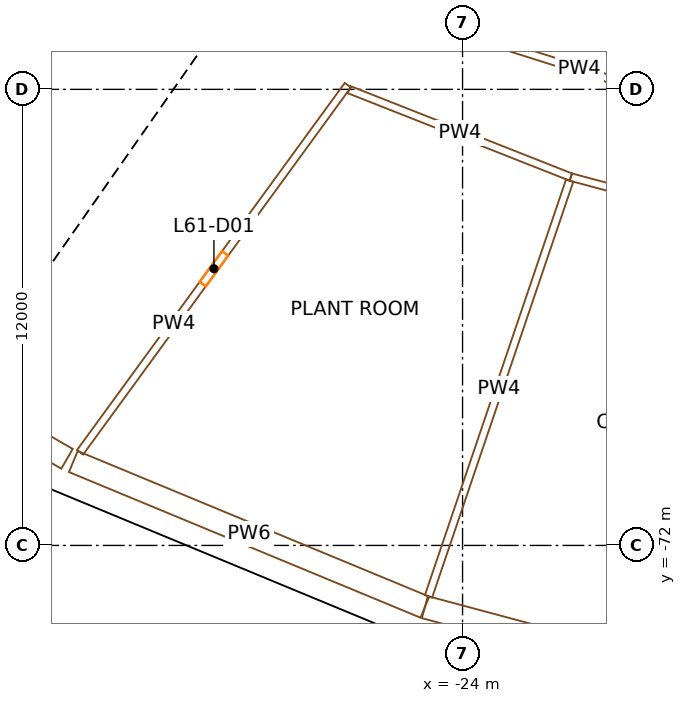
"""IFC4 building model, lengths in metres.
Left out: names, types, materials, properties, quantities, classifications, styles, units other than length and angle.
Written with IfcOpenShell. Run it as: python <this file> out.ifc"""

import sys

from ifc_helpers import new_model, si_unit, direction, frame, frame_2d, origin, origin_2d, place, context, subcontext, project, spatial, rectangle, extrude, element, fill, save


model = new_model("IFC4")
c1 = context("Model", 3, precision=1e-05, world=origin(), true_north=direction((0.0, 1.0)))
c2 = subcontext(c1, "Body", "Model", "MODEL_VIEW")
j1 = project(units=[si_unit("LENGTHUNIT", "METRE"), si_unit("PLANEANGLEUNIT", "RADIAN")], contexts=[c1])
p1 = place(None, origin())
s1 = spatial("IfcSite", under=j1, at=p1, CompositionType="ELEMENT")
p2 = place(p1, origin())
s2 = spatial("IfcBuilding", under=s1, at=p2, CompositionType="ELEMENT")
p3 = place(p2, frame((0.0, 0.0, 253.1)))
s3 = spatial("IfcBuildingStorey", under=s2, at=p3, CompositionType="ELEMENT", Elevation=253.1)
for number, where, z_axis, x_axis in (
    (1, (-34.388, -69.732, 0.0), (0.0, 0.0, 1.0), (0.897, -0.442, 0.0)),
    (2, (-24.992, -73.624, 0.0), (0.0, 0.0, 1.0), (0.947, -0.321, 0.0)),
):
    element("IfcColumn", number, at=place(p3, frame(where, z_axis=z_axis, x_axis=x_axis)), inside=s3, PredefinedType="COLUMN", context=c2, shape_type="SweptSolid", body=[
        extrude(rectangle(XDim=1.0, YDim=1.15, at=origin_2d()), origin(), (0.0, 0.0, 1.0), 5.0),
    ])
p4 = place(p3, frame((-36.667, -66.005, 0.0), z_axis=(0.0, 0.0, 1.0), x_axis=(0.573568499524, 0.819157601658, 0.0)))
e3 = element("IfcWall", 3, at=p4, inside=s3, PredefinedType="SHEAR", context=c2, shape_type="SweptSolid", body=[
    extrude(rectangle(XDim=14.2, YDim=0.6, at=frame_2d((7.1, 0.0))), origin(), (0.0, 0.0, 1.0), 4.7),
])
p5 = place(p4, frame((5.9, 0.0, 0.0)))
e4 = element("IfcOpeningElement", 4, at=p5, cuts=e3, PredefinedType="OPENING", context=c2, shape_type="SweptSolid", body=[
    extrude(rectangle(XDim=2.4, YDim=2.1, at=frame_2d((1.2, 1.05))), frame((0.0, 0.31, 0.0), z_axis=(0.0, -1.0, 0.0), x_axis=(1.0, 0.0, 0.0)), (0.0, 0.0, 1.0), 0.62),
])
p6 = place(p3, frame((-33.787, -61.369, 0.0), z_axis=(0.0, 0.0, 1.0), x_axis=(-0.819152564888, 0.573575692858, 0.0)))
e5 = element("IfcWall", 5, at=p6, inside=s3, PredefinedType="SOLIDWALL", context=c2, shape_type="SweptSolid", body=[
    extrude(rectangle(XDim=7.95, YDim=0.3, at=frame_2d((3.975, 0.0))), origin(), (0.0, 0.0, 1.0), 4.7),
])
p7 = place(p6, frame((0.675, 0.0, 0.0)))
e6 = element("IfcOpeningElement", 6, at=p7, cuts=e5, PredefinedType="OPENING", context=c2, shape_type="SweptSolid", body=[
    extrude(rectangle(XDim=1.1, YDim=2.1, at=frame_2d((0.55, 1.05))), frame((0.0, 0.16, 0.0), z_axis=(0.0, -1.0, 0.0), x_axis=(1.0, 0.0, 0.0)), (0.0, 0.0, 1.0), 0.32),
])
p8 = place(p6, frame((3.425, 0.0, 0.0)))
e7 = element("IfcOpeningElement", 7, at=p8, cuts=e5, PredefinedType="OPENING", context=c2, shape_type="SweptSolid", body=[
    extrude(rectangle(XDim=1.1, YDim=2.1, at=frame_2d((0.55, 1.05))), frame((0.0, 0.16, 0.0), z_axis=(0.0, -1.0, 0.0), x_axis=(1.0, 0.0, 0.0)), (0.0, 0.0, 1.0), 0.32),
])
p9 = place(p6, frame((6.175, 0.0, 0.0)))
e8 = element("IfcOpeningElement", 8, at=p9, cuts=e5, PredefinedType="OPENING", context=c2, shape_type="SweptSolid", body=[
    extrude(rectangle(XDim=1.1, YDim=2.1, at=frame_2d((0.55, 1.05))), frame((0.0, 0.16, 0.0), z_axis=(0.0, -1.0, 0.0), x_axis=(1.0, 0.0, 0.0)), (0.0, 0.0, 1.0), 0.32),
])
p10 = place(p3, frame((-43.606, -65.216, 0.0), z_axis=(0.0, 0.0, 1.0), x_axis=(0.86601841335, -0.500012107593, 0.0)))
e9 = element("IfcWall", 9, at=p10, inside=s3, PredefinedType="SOLIDWALL", context=c2, shape_type="SweptSolid", body=[
    extrude(rectangle(XDim=10.312, YDim=0.4, at=frame_2d((5.156, 0.0))), origin(), (0.0, 0.0, 1.0), 3.6),
])
p11 = place(p3, frame((-34.65, -70.379, 0.0), z_axis=(0.0, 0.0, 1.0), x_axis=(0.923876839767, -0.38268993316, 0.0)))
e10 = element("IfcWall", 10, at=p11, inside=s3, PredefinedType="SOLIDWALL", context=c2, shape_type="SweptSolid", body=[
    extrude(rectangle(XDim=10.16, YDim=0.4, at=frame_2d((5.08, 0.0))), origin(), (0.0, 0.0, 1.0), 3.6),
])
p12 = place(p3, frame((-43.176, -64.658, 0.0), z_axis=(0.0, 0.0, 1.0), x_axis=(0.866037016931, -0.4999798849, 0.0)))
e11 = element("IfcWall", 11, at=p12, inside=s3, PredefinedType="PARTITIONING", context=c2, shape_type="SweptSolid", body=[
    extrude(rectangle(XDim=10.125, YDim=0.6, at=frame_2d((5.062, 0.0))), origin(), (0.0, 0.0, 1.0), 3.6),
])
p13 = place(p3, frame((-34.241, -69.792, 0.0), z_axis=(0.0, 0.0, 1.0), x_axis=(0.923878627441, -0.38268561739, 0.0)))
e12 = element("IfcWall", 12, at=p13, inside=s3, PredefinedType="PARTITIONING", context=c2, shape_type="SweptSolid", body=[
    extrude(rectangle(XDim=10.012, YDim=0.6, at=frame_2d((5.006, 0.0))), origin(), (0.0, 0.0, 1.0), 3.6),
])
p14 = place(p3, frame((-27.019, -59.889, 0.0), z_axis=(0.0, 0.0, 1.0), x_axis=(-0.589263800386, -0.807940699281, 0.0)))
e13 = element("IfcWall", 13, at=p14, inside=s3, PredefinedType="PARTITIONING", context=c2, shape_type="SweptSolid", body=[
    extrude(rectangle(XDim=11.957, YDim=0.2, at=frame_2d((5.979, 0.0))), origin(), (0.0, 0.0, 1.0), 3.6),
])
p15 = place(p14, frame((5.479, 0.0, 0.0)))
e14 = element("IfcOpeningElement", 14, at=p15, cuts=e13, PredefinedType="OPENING", context=c2, shape_type="SweptSolid", body=[
    extrude(rectangle(XDim=1.0, YDim=2.1, at=frame_2d((0.5, 1.05))), frame((0.0, 0.11, 0.0), z_axis=(0.0, -1.0, 0.0), x_axis=(1.0, 0.0, 0.0)), (0.0, 0.0, 1.0), 0.22),
])
p16 = place(p3, frame((-26.985, -60.007, 0.0), z_axis=(0.0, 0.0, 1.0), x_axis=(0.930256649469, -0.366909479463, 0.0)))
e15 = element("IfcWall", 15, at=p16, inside=s3, PredefinedType="PARTITIONING", context=c2, shape_type="SweptSolid", body=[
    extrude(rectangle(XDim=6.271, YDim=0.2, at=frame_2d((3.136, 0.0))), origin(), (0.0, 0.0, 1.0), 3.6),
])
p17 = place(p3, frame((-25.536, -58.018, 0.0), z_axis=(0.0, 0.0, 1.0), x_axis=(0.953461291076, -0.301515449719, 0.0)))
e16 = element("IfcWall", 16, at=p17, inside=s3, PredefinedType="PARTITIONING", context=c2, shape_type="SweptSolid", body=[
    extrude(rectangle(XDim=13.811, YDim=0.2, at=frame_2d((6.905, 0.0))), origin(), (0.0, 0.0, 1.0), 3.6),
])
p18 = place(p17, frame((6.405, 0.0, 0.0)))
e17 = element("IfcOpeningElement", 17, at=p18, cuts=e16, PredefinedType="OPENING", context=c2, shape_type="SweptSolid", body=[
    extrude(rectangle(XDim=1.0, YDim=2.1, at=frame_2d((0.5, 1.05))), frame((0.0, 0.11, 0.0), z_axis=(0.0, -1.0, 0.0), x_axis=(1.0, 0.0, 0.0)), (0.0, 0.0, 1.0), 0.22),
])
p19 = place(p3, frame((-24.896, -73.34, 0.0), z_axis=(0.0, 0.0, 1.0), x_axis=(0.321435459645, 0.946931489223, 0.0)))
e18 = element("IfcWall", 18, at=p19, inside=s3, PredefinedType="PARTITIONING", context=c2, shape_type="SweptSolid", body=[
    extrude(rectangle(XDim=11.55, YDim=0.2, at=frame_2d((5.775, 0.0))), origin(), (0.0, 0.0, 1.0), 3.6),
])
p20 = place(p3, frame((-24.992, -73.624, 0.0), z_axis=(0.0, 0.0, 1.0), x_axis=(0.965924263558, -0.258824877223, 0.0)))
e19 = element("IfcWall", 19, at=p20, inside=s3, PredefinedType="PARTITIONING", context=c2, shape_type="SweptSolid", body=[
    extrude(rectangle(XDim=10.17, YDim=0.6, at=frame_2d((5.085, 0.0))), origin(), (0.0, 0.0, 1.0), 3.6),
])
p21 = place(p3, frame((-12.837, -64.536, 0.0), z_axis=(0.0, 0.0, 1.0), x_axis=(-0.965929186451, 0.258806504483, 0.0)))
e20 = element("IfcWall", 20, at=p21, inside=s3, PredefinedType="PARTITIONING", context=c2, shape_type="SweptSolid", body=[
    extrude(rectangle(XDim=8.607, YDim=0.2, at=frame_2d((4.303, 0.0))), origin(), (0.0, 0.0, 1.0), 3.6),
])
p22 = place(p21, frame((3.803, 0.0, 0.0)))
e21 = element("IfcOpeningElement", 21, at=p22, cuts=e20, PredefinedType="OPENING", context=c2, shape_type="SweptSolid", body=[
    extrude(rectangle(XDim=1.0, YDim=2.1, at=frame_2d((0.5, 1.05))), frame((0.0, 0.11, 0.0), z_axis=(0.0, -1.0, 0.0), x_axis=(1.0, 0.0, 0.0)), (0.0, 0.0, 1.0), 0.22),
])
p23 = place(p5, origin())
e22 = element("IfcDoor", 22, at=p23, inside=s3, OperationType="DOUBLE_DOOR_SINGLE_SWING", PredefinedType="DOOR", context=c2, shape_type="SweptSolid", body=[
    extrude(rectangle(XDim=2.4, YDim=2.1, at=frame_2d((1.2, 1.05))), frame((0.0, 0.025, 0.0), z_axis=(0.0, -1.0, 0.0), x_axis=(1.0, 0.0, 0.0)), (0.0, 0.0, 1.0), 0.05),
])
fill(e4, e22)
p24 = place(p7, origin())
e23 = element("IfcDoor", 23, at=p24, inside=s3, OperationType="DOUBLE_DOOR_SLIDING", PredefinedType="DOOR", context=c2, shape_type="SweptSolid", body=[
    extrude(rectangle(XDim=1.1, YDim=2.1, at=frame_2d((0.55, 1.05))), frame((0.0, 0.025, 0.0), z_axis=(0.0, -1.0, 0.0), x_axis=(1.0, 0.0, 0.0)), (0.0, 0.0, 1.0), 0.05),
])
fill(e6, e23)
p25 = place(p15, origin())
e24 = element("IfcDoor", 24, at=p25, inside=s3, OperationType="SINGLE_SWING_RIGHT", PredefinedType="DOOR", context=c2, shape_type="SweptSolid", body=[
    extrude(rectangle(XDim=1.0, YDim=2.1, at=frame_2d((0.5, 1.05))), frame((0.0, 0.025, 0.0), z_axis=(0.0, -1.0, 0.0), x_axis=(1.0, 0.0, 0.0)), (0.0, 0.0, 1.0), 0.05),
])
fill(e14, e24)
save(model, sys.argv[1])
